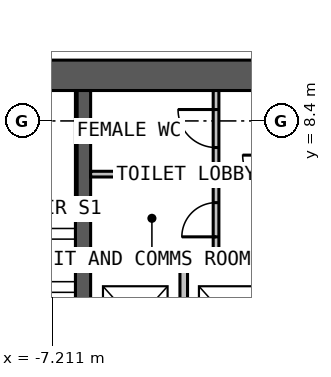
"""IFC4 building model, lengths in metres.
Left out: names, types, materials, properties, quantities, classifications, styles, units other than length and angle.
Written with IfcOpenShell. Run it as: python <this file> out.ifc"""

import sys

from ifc_helpers import new_model, si_unit, direction, frame, frame_2d, origin, place, context, subcontext, project, spatial, rectangle, extrude, element, fill, save


model = new_model("IFC4")
c1 = context("Model", 3, precision=1e-05, world=origin(), true_north=direction((0.0, 1.0)))
c2 = subcontext(c1, "Body", "Model", "MODEL_VIEW")
j1 = project(units=[si_unit("LENGTHUNIT", "METRE"), si_unit("PLANEANGLEUNIT", "RADIAN")], contexts=[c1])
p1 = place(None, origin())
s1 = spatial("IfcSite", under=j1, at=p1, CompositionType="ELEMENT")
p2 = place(p1, origin())
s2 = spatial("IfcBuilding", under=s1, at=p2, CompositionType="ELEMENT")
p3 = place(p2, frame((0.0, 0.0, 45.0)))
s3 = spatial("IfcBuildingStorey", under=s2, at=p3, CompositionType="ELEMENT", Elevation=45.0)
p4 = place(p3, frame((-10.0, 9.6, 0.0), z_axis=(0.0, 0.0, 1.0), x_axis=(1.0, 0.0, 0.0)))
e1 = element("IfcWall", 1, at=p4, inside=s3, PredefinedType="SOLIDWALL", context=c2, shape_type="SweptSolid", body=[
    extrude(rectangle(XDim=20.0, YDim=0.8, at=frame_2d((10.0, 0.0))), origin(), (0.0, 0.0, 1.0), 4.0),
])
p5 = place(p4, frame((9.4, 0.0, 0.0)))
e2 = element("IfcOpeningElement", 2, at=p5, cuts=e1, PredefinedType="OPENING", context=c2, shape_type="SweptSolid", body=[
    extrude(rectangle(XDim=1.2, YDim=2.2, at=frame_2d((0.6, 1.1))), frame((0.0, 0.41, 0.0), z_axis=(0.0, -1.0, 0.0), x_axis=(1.0, 0.0, 0.0)), (0.0, 0.0, 1.0), 0.82),
])
p6 = place(p3, frame((-6.4, -9.2, 0.0), z_axis=(0.0, 0.0, 1.0), x_axis=(0.0, 1.0, 0.0)))
e3 = element("IfcWall", 3, at=p6, inside=s3, PredefinedType="SOLIDWALL", context=c2, shape_type="SweptSolid", body=[
    extrude(rectangle(XDim=18.4, YDim=0.4, at=frame_2d((9.2, 0.0))), origin(), (0.0, 0.0, 1.0), 4.0),
])
p7 = place(p6, frame((8.7, 0.0, 0.0)))
e4 = element("IfcOpeningElement", 4, at=p7, cuts=e3, PredefinedType="OPENING", context=c2, shape_type="SweptSolid", body=[
    extrude(rectangle(XDim=1.0, YDim=2.2, at=frame_2d((0.5, 1.1))), frame((0.0, 0.21, 0.0), z_axis=(0.0, -1.0, 0.0), x_axis=(1.0, 0.0, 0.0)), (0.0, 0.0, 1.0), 0.42),
])
p8 = place(p3, frame((-6.2, 4.6, 0.0), z_axis=(0.0, 0.0, 1.0), x_axis=(1.0, 0.0, 0.0)))
e5 = element("IfcWall", 5, at=p8, inside=s3, PredefinedType="SOLIDWALL", context=c2, shape_type="SweptSolid", body=[
    extrude(rectangle(XDim=4.85, YDim=0.3, at=frame_2d((2.425, 0.0))), origin(), (0.0, 0.0, 1.0), 4.0),
])
p9 = place(p3, frame((-3.75, 1.75, 0.0), z_axis=(0.0, 0.0, 1.0), x_axis=(0.0, 1.0, 0.0)))
e6 = element("IfcWall", 6, at=p9, inside=s3, PredefinedType="SOLIDWALL", context=c2, shape_type="SweptSolid", body=[
    extrude(rectangle(XDim=2.7, YDim=0.2, at=frame_2d((1.35, 0.0))), origin(), (0.0, 0.0, 1.0), 3.75),
])
p10 = place(p3, frame((-2.9, 4.75, 0.0), z_axis=(0.0, 0.0, 1.0), x_axis=(0.0, 1.0, 0.0)))
e7 = element("IfcWall", 7, at=p10, inside=s3, PredefinedType="PARTITIONING", context=c2, shape_type="SweptSolid", body=[
    extrude(rectangle(XDim=4.45, YDim=0.15, at=frame_2d((2.225, 0.0))), origin(), (0.0, 0.0, 1.0), 3.75),
])
p11 = place(p10, frame((2.95, 0.0, 0.0)))
e8 = element("IfcOpeningElement", 8, at=p11, cuts=e7, PredefinedType="OPENING", context=c2, shape_type="SweptSolid", body=[
    extrude(rectangle(XDim=1.0, YDim=2.2, at=frame_2d((0.5, 1.1))), frame((0.0, 0.085, 0.0), z_axis=(0.0, -1.0, 0.0), x_axis=(1.0, 0.0, 0.0)), (0.0, 0.0, 1.0), 0.17),
])
p12 = place(p10, frame((0.6, 0.0, 0.0)))
e9 = element("IfcOpeningElement", 9, at=p12, cuts=e7, PredefinedType="OPENING", context=c2, shape_type="SweptSolid", body=[
    extrude(rectangle(XDim=0.9, YDim=2.2, at=frame_2d((0.45, 1.1))), frame((0.0, 0.085, 0.0), z_axis=(0.0, -1.0, 0.0), x_axis=(1.0, 0.0, 0.0)), (0.0, 0.0, 1.0), 0.17),
])
p13 = place(p3, frame((-6.2, 7.0, 0.0), z_axis=(0.0, 0.0, 1.0), x_axis=(1.0, 0.0, 0.0)))
e10 = element("IfcWall", 10, at=p13, inside=s3, PredefinedType="PARTITIONING", context=c2, shape_type="SweptSolid", body=[
    extrude(rectangle(XDim=3.225, YDim=0.15, at=frame_2d((1.612, 0.0))), origin(), (0.0, 0.0, 1.0), 3.75),
])
p14 = place(p11, origin())
e11 = element("IfcDoor", 11, at=p14, inside=s3, OperationType="SINGLE_SWING_RIGHT", PredefinedType="DOOR", context=c2, shape_type="SweptSolid", body=[
    extrude(rectangle(XDim=1.0, YDim=2.2, at=frame_2d((0.5, 1.1))), frame((0.0, 0.025, 0.0), z_axis=(0.0, -1.0, 0.0), x_axis=(1.0, 0.0, 0.0)), (0.0, 0.0, 1.0), 0.05),
])
fill(e8, e11)
p15 = place(p12, origin())
e12 = element("IfcDoor", 12, at=p15, inside=s3, OperationType="SINGLE_SWING_LEFT", PredefinedType="DOOR", context=c2, shape_type="SweptSolid", body=[
    extrude(rectangle(XDim=0.9, YDim=2.2, at=frame_2d((0.45, 1.1))), frame((0.0, 0.025, 0.0), z_axis=(0.0, -1.0, 0.0), x_axis=(1.0, 0.0, 0.0)), (0.0, 0.0, 1.0), 0.05),
])
fill(e9, e12)
save(model, sys.argv[1])
